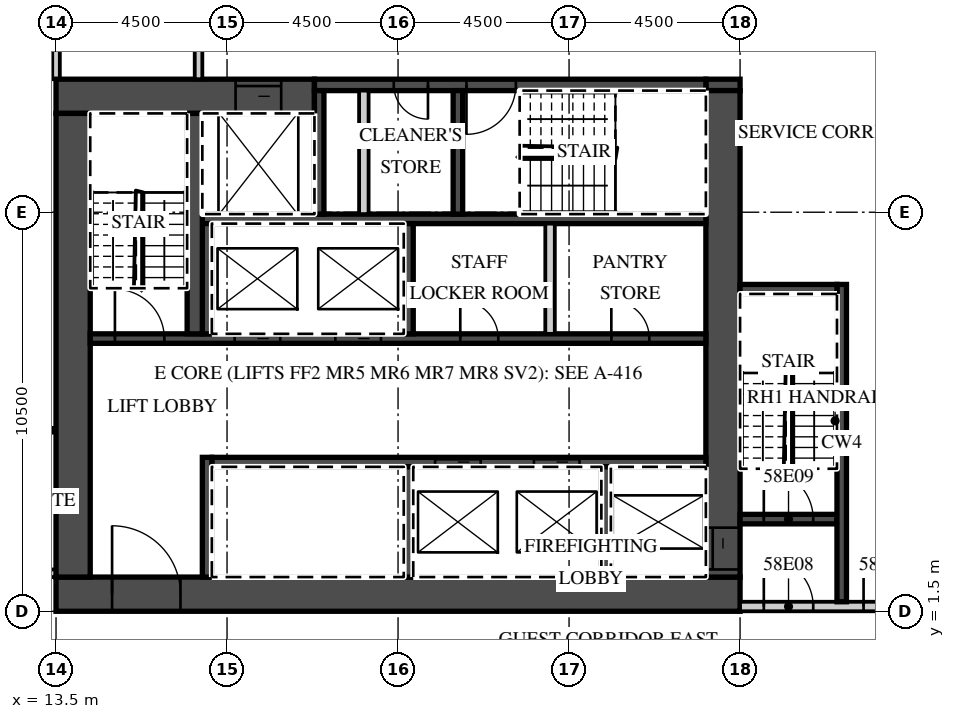
"""IFC4 building model, lengths in metres.
Left out: names, types, materials, properties, quantities, classifications, styles, units other than length and angle.
Written with IfcOpenShell. Run it as: python <this file> out.ifc"""

import sys

from ifc_helpers import new_model, si_unit, direction, frame, frame_2d, origin, place, context, subcontext, project, spatial, rectangle, extrude, element, fill, save


model = new_model("IFC4")
c1 = context("Model", 3, precision=1e-05, world=origin(), true_north=direction((0.0, 1.0)))
c2 = subcontext(c1, "Body", "Model", "MODEL_VIEW")
j1 = project(units=[si_unit("LENGTHUNIT", "METRE"), si_unit("PLANEANGLEUNIT", "RADIAN")], contexts=[c1])
p1 = place(None, origin())
s1 = spatial("IfcSite", under=j1, at=p1, CompositionType="ELEMENT")
p2 = place(p1, origin())
s2 = spatial("IfcBuilding", under=s1, at=p2, CompositionType="ELEMENT")
p3 = place(p2, frame((0.0, 0.0, 237.5)))
s3 = spatial("IfcBuildingStorey", under=s2, at=p3, CompositionType="ELEMENT", Elevation=237.5)
p4 = place(p3, frame((13.5, 15.5, 0.0), z_axis=(0.0, 0.0, 1.0), x_axis=(0.0, 1.0, 0.0)))
e1 = element("IfcWall", 1, at=p4, inside=s3, PredefinedType="PARTITIONING", context=c2, shape_type="SweptSolid", body=[
    extrude(rectangle(XDim=5.436, YDim=0.2, at=frame_2d((2.718, 0.0))), origin(), (0.0, 0.0, 1.0), 3.02),
])
p5 = place(p3, frame((-13.5, 2.5, 0.0), z_axis=(0.0, 0.0, 1.0), x_axis=(1.0, 0.0, 0.0)))
e2 = element("IfcWall", 2, at=p5, inside=s3, PredefinedType="PARTITIONING", context=c2, shape_type="SweptSolid", body=[
    extrude(rectangle(XDim=27.0, YDim=0.2, at=frame_2d((13.5, 0.0))), origin(), (0.0, 0.0, 1.0), 3.02),
])
p6 = place(p5, frame((2.925, 0.0, 0.0)))
e3 = element("IfcOpeningElement", 3, at=p6, cuts=e2, PredefinedType="OPENING", context=c2, shape_type="SweptSolid", body=[
    extrude(rectangle(XDim=1.0, YDim=2.1, at=frame_2d((0.5, 1.05))), frame((0.0, 0.11, 0.0), z_axis=(0.0, -1.0, 0.0), x_axis=(1.0, 0.0, 0.0)), (0.0, 0.0, 1.0), 0.22),
])
p7 = place(p5, frame((7.45, 0.0, 0.0)))
e4 = element("IfcOpeningElement", 4, at=p7, cuts=e2, PredefinedType="OPENING", context=c2, shape_type="SweptSolid", body=[
    extrude(rectangle(XDim=1.0, YDim=2.1, at=frame_2d((0.5, 1.05))), frame((0.0, 0.11, 0.0), z_axis=(0.0, -1.0, 0.0), x_axis=(1.0, 0.0, 0.0)), (0.0, 0.0, 1.0), 0.22),
])
p8 = place(p5, frame((11.925, 0.0, 0.0)))
e5 = element("IfcOpeningElement", 5, at=p8, cuts=e2, PredefinedType="OPENING", context=c2, shape_type="SweptSolid", body=[
    extrude(rectangle(XDim=1.0, YDim=2.1, at=frame_2d((0.5, 1.05))), frame((0.0, 0.11, 0.0), z_axis=(0.0, -1.0, 0.0), x_axis=(1.0, 0.0, 0.0)), (0.0, 0.0, 1.0), 0.22),
])
p9 = place(p5, frame((16.45, 0.0, 0.0)))
e6 = element("IfcOpeningElement", 6, at=p9, cuts=e2, PredefinedType="OPENING", context=c2, shape_type="SweptSolid", body=[
    extrude(rectangle(XDim=1.0, YDim=2.1, at=frame_2d((0.5, 1.05))), frame((0.0, 0.11, 0.0), z_axis=(0.0, -1.0, 0.0), x_axis=(1.0, 0.0, 0.0)), (0.0, 0.0, 1.0), 0.22),
])
p10 = place(p5, frame((18.55, 0.0, 0.0)))
e7 = element("IfcOpeningElement", 7, at=p10, cuts=e2, PredefinedType="OPENING", context=c2, shape_type="SweptSolid", body=[
    extrude(rectangle(XDim=1.0, YDim=2.1, at=frame_2d((0.5, 1.05))), frame((0.0, 0.11, 0.0), z_axis=(0.0, -1.0, 0.0), x_axis=(1.0, 0.0, 0.0)), (0.0, 0.0, 1.0), 0.22),
])
p11 = place(p5, frame((23.075, 0.0, 0.0)))
e8 = element("IfcOpeningElement", 8, at=p11, cuts=e2, PredefinedType="OPENING", context=c2, shape_type="SweptSolid", body=[
    extrude(rectangle(XDim=1.0, YDim=2.1, at=frame_2d((0.5, 1.05))), frame((0.0, 0.11, 0.0), z_axis=(0.0, -1.0, 0.0), x_axis=(1.0, 0.0, 0.0)), (0.0, 0.0, 1.0), 0.22),
])
p12 = place(p3, frame((13.5, 1.95, 0.0), z_axis=(0.0, 0.0, 1.0), x_axis=(1.0, 0.0, 0.0)))
e9 = element("IfcWall", 9, at=p12, inside=s3, PredefinedType="SHEAR", context=c2, shape_type="SweptSolid", body=[
    extrude(rectangle(XDim=18.0, YDim=0.9, at=frame_2d((9.0, 0.0))), origin(), (0.0, 0.0, 1.0), 3.02),
])
p13 = place(p12, frame((1.475, 0.0, 0.0)))
e10 = element("IfcOpeningElement", 10, at=p13, cuts=e9, PredefinedType="OPENING", context=c2, shape_type="SweptSolid", body=[
    extrude(rectangle(XDim=1.8, YDim=2.1, at=frame_2d((0.9, 1.05))), frame((0.0, 0.46, 0.0), z_axis=(0.0, -1.0, 0.0), x_axis=(1.0, 0.0, 0.0)), (0.0, 0.0, 1.0), 0.92),
])
p14 = place(p3, frame((13.5, 15.05, 0.0), z_axis=(0.0, 0.0, 1.0), x_axis=(1.0, 0.0, 0.0)))
e11 = element("IfcWall", 11, at=p14, inside=s3, PredefinedType="SHEAR", context=c2, shape_type="SweptSolid", body=[
    extrude(rectangle(XDim=6.8, YDim=0.9, at=frame_2d((3.4, 0.0))), origin(), (0.0, 0.0, 1.0), 3.02),
])
p15 = place(p14, frame((4.725, 0.0, 0.0)))
e12 = element("IfcOpeningElement", 12, at=p15, cuts=e11, PredefinedType="OPENING", context=c2, shape_type="SweptSolid", body=[
    extrude(rectangle(XDim=1.2, YDim=2.1, at=frame_2d((0.6, 1.05))), frame((0.0, 0.46, 0.0), z_axis=(0.0, -1.0, 0.0), x_axis=(1.0, 0.0, 0.0)), (0.0, 0.0, 1.0), 0.92),
])
p16 = place(p3, frame((30.6, 15.35, 0.0), z_axis=(0.0, 0.0, 1.0), x_axis=(1.0, 0.0, 0.0)))
e13 = element("IfcWall", 13, at=p16, inside=s3, PredefinedType="SHEAR", context=c2, shape_type="SweptSolid", body=[
    extrude(rectangle(XDim=0.9, YDim=0.3, at=frame_2d((0.45, 0.0))), origin(), (0.0, 0.0, 1.0), 3.02),
])
p17 = place(p3, frame((20.3, 15.35, 0.0), z_axis=(0.0, 0.0, 1.0), x_axis=(1.0, 0.0, 0.0)))
e14 = element("IfcWall", 14, at=p17, inside=s3, PredefinedType="SHEAR", context=c2, shape_type="SweptSolid", body=[
    extrude(rectangle(XDim=10.3, YDim=0.3, at=frame_2d((5.15, 0.0))), origin(), (0.0, 0.0, 1.0), 3.02),
])
p18 = place(p17, frame((4.0, 0.0, 0.0)))
e15 = element("IfcOpeningElement", 15, at=p18, cuts=e14, PredefinedType="OPENING", context=c2, shape_type="SweptSolid", body=[
    extrude(rectangle(XDim=1.3, YDim=2.1, at=frame_2d((0.65, 1.05))), frame((0.0, 0.16, 0.0), z_axis=(0.0, -1.0, 0.0), x_axis=(1.0, 0.0, 0.0)), (0.0, 0.0, 1.0), 0.32),
])
p19 = place(p17, frame((2.087, 0.0, 0.0)))
e16 = element("IfcOpeningElement", 16, at=p19, cuts=e14, PredefinedType="OPENING", context=c2, shape_type="SweptSolid", body=[
    extrude(rectangle(XDim=0.9, YDim=2.1, at=frame_2d((0.45, 1.05))), frame((0.0, 0.16, 0.0), z_axis=(0.0, -1.0, 0.0), x_axis=(1.0, 0.0, 0.0)), (0.0, 0.0, 1.0), 0.32),
])
p20 = place(p3, frame((31.05, 2.4, 0.0), z_axis=(0.0, 0.0, 1.0), x_axis=(0.0, 1.0, 0.0)))
e17 = element("IfcWall", 17, at=p20, inside=s3, PredefinedType="SHEAR", context=c2, shape_type="SweptSolid", body=[
    extrude(rectangle(XDim=12.8, YDim=0.9, at=frame_2d((6.4, 0.0))), origin(), (0.0, 0.0, 1.0), 3.02),
])
p21 = place(p20, frame((0.2, 0.0, 0.0)))
e18 = element("IfcOpeningElement", 18, at=p21, cuts=e17, PredefinedType="OPENING", context=c2, shape_type="SweptSolid", body=[
    extrude(rectangle(XDim=1.1, YDim=2.1, at=frame_2d((0.55, 1.05))), frame((0.0, 0.46, 0.0), z_axis=(0.0, -1.0, 0.0), x_axis=(1.0, 0.0, 0.0)), (0.0, 0.0, 1.0), 0.92),
])
p22 = place(p3, frame((13.95, 2.4, 0.0), z_axis=(0.0, 0.0, 1.0), x_axis=(0.0, 1.0, 0.0)))
e19 = element("IfcWall", 19, at=p22, inside=s3, PredefinedType="SHEAR", context=c2, shape_type="SweptSolid", body=[
    extrude(rectangle(XDim=12.2, YDim=0.9, at=frame_2d((6.1, 0.0))), origin(), (0.0, 0.0, 1.0), 3.02),
])
p23 = place(p3, frame((17.6, 5.425, 0.0), z_axis=(0.0, 0.0, 1.0), x_axis=(1.0, 0.0, 0.0)))
e20 = element("IfcWall", 20, at=p23, inside=s3, PredefinedType="SHEAR", context=c2, shape_type="SweptSolid", body=[
    extrude(rectangle(XDim=13.0, YDim=0.25, at=frame_2d((6.5, 0.0))), origin(), (0.0, 0.0, 1.0), 3.02),
])
p24 = place(p23, frame((8.475, 0.0, 0.0)))
e21 = element("IfcOpeningElement", 21, at=p24, cuts=e20, PredefinedType="OPENING", context=c2, shape_type="SweptSolid", body=[
    extrude(rectangle(XDim=1.2, YDim=2.1, at=frame_2d((0.6, 1.05))), frame((0.0, 0.135, 0.0), z_axis=(0.0, -1.0, 0.0), x_axis=(1.0, 0.0, 0.0)), (0.0, 0.0, 1.0), 0.27),
])
p25 = place(p23, frame((5.875, 0.0, 0.0)))
e22 = element("IfcOpeningElement", 22, at=p25, cuts=e20, PredefinedType="OPENING", context=c2, shape_type="SweptSolid", body=[
    extrude(rectangle(XDim=1.2, YDim=2.1, at=frame_2d((0.6, 1.05))), frame((0.0, 0.135, 0.0), z_axis=(0.0, -1.0, 0.0), x_axis=(1.0, 0.0, 0.0)), (0.0, 0.0, 1.0), 0.27),
])
p26 = place(p3, frame((17.475, 2.4, 0.0), z_axis=(0.0, 0.0, 1.0), x_axis=(0.0, 1.0, 0.0)))
e23 = element("IfcWall", 23, at=p26, inside=s3, PredefinedType="SHEAR", context=c2, shape_type="SweptSolid", body=[
    extrude(rectangle(XDim=3.15, YDim=0.25, at=frame_2d((1.575, 0.0))), origin(), (0.0, 0.0, 1.0), 3.02),
])
for number, where, z_axis, x_axis in (
    (24, (27.975, 2.4, 0.0), (0.0, 0.0, 1.0), (0.0, 1.0, 0.0)),
    (25, (22.775, 2.4, 0.0), (0.0, 0.0, 1.0), (0.0, 1.0, 0.0)),
):
    element("IfcWall", number, at=place(p3, frame(where, z_axis=z_axis, x_axis=x_axis)), inside=s3, PredefinedType="SHEAR", context=c2, shape_type="SweptSolid", body=[
        extrude(rectangle(XDim=2.9, YDim=0.25, at=frame_2d((1.45, 0.0))), origin(), (0.0, 0.0, 1.0), 3.02),
    ])
p27 = place(p3, frame((14.4, 8.675, 0.0), z_axis=(0.0, 0.0, 1.0), x_axis=(1.0, 0.0, 0.0)))
e26 = element("IfcWall", 26, at=p27, inside=s3, PredefinedType="SHEAR", context=c2, shape_type="SweptSolid", body=[
    extrude(rectangle(XDim=16.2, YDim=0.25, at=frame_2d((8.1, 0.0))), origin(), (0.0, 0.0, 1.0), 3.02),
])
p28 = place(p27, frame((6.45, 0.0, 0.0)))
e27 = element("IfcOpeningElement", 27, at=p28, cuts=e26, PredefinedType="OPENING", context=c2, shape_type="SweptSolid", body=[
    extrude(rectangle(XDim=1.2, YDim=2.1, at=frame_2d((0.6, 1.05))), frame((0.0, 0.135, 0.0), z_axis=(0.0, -1.0, 0.0), x_axis=(1.0, 0.0, 0.0)), (0.0, 0.0, 1.0), 0.27),
])
p29 = place(p27, frame((3.8, 0.0, 0.0)))
e28 = element("IfcOpeningElement", 28, at=p29, cuts=e26, PredefinedType="OPENING", context=c2, shape_type="SweptSolid", body=[
    extrude(rectangle(XDim=1.2, YDim=2.1, at=frame_2d((0.6, 1.05))), frame((0.0, 0.135, 0.0), z_axis=(0.0, -1.0, 0.0), x_axis=(1.0, 0.0, 0.0)), (0.0, 0.0, 1.0), 0.27),
])
p30 = place(p27, frame((0.65, 0.0, 0.0)))
e29 = element("IfcOpeningElement", 29, at=p30, cuts=e26, PredefinedType="OPENING", context=c2, shape_type="SweptSolid", body=[
    extrude(rectangle(XDim=1.3, YDim=2.1, at=frame_2d((0.65, 1.05))), frame((0.0, 0.135, 0.0), z_axis=(0.0, -1.0, 0.0), x_axis=(1.0, 0.0, 0.0)), (0.0, 0.0, 1.0), 0.27),
])
p31 = place(p27, frame((13.712, 0.0, 0.0)))
e30 = element("IfcOpeningElement", 30, at=p31, cuts=e26, PredefinedType="OPENING", context=c2, shape_type="SweptSolid", body=[
    extrude(rectangle(XDim=1.0, YDim=2.1, at=frame_2d((0.5, 1.05))), frame((0.0, 0.135, 0.0), z_axis=(0.0, -1.0, 0.0), x_axis=(1.0, 0.0, 0.0)), (0.0, 0.0, 1.0), 0.27),
])
p32 = place(p27, frame((9.738, 0.0, 0.0)))
e31 = element("IfcOpeningElement", 31, at=p32, cuts=e26, PredefinedType="OPENING", context=c2, shape_type="SweptSolid", body=[
    extrude(rectangle(XDim=1.0, YDim=2.1, at=frame_2d((0.5, 1.05))), frame((0.0, 0.135, 0.0), z_axis=(0.0, -1.0, 0.0), x_axis=(1.0, 0.0, 0.0)), (0.0, 0.0, 1.0), 0.27),
])
p33 = place(p3, frame((17.35, 11.825, 0.0), z_axis=(0.0, 0.0, 1.0), x_axis=(1.0, 0.0, 0.0)))
e32 = element("IfcWall", 32, at=p33, inside=s3, PredefinedType="SHEAR", context=c2, shape_type="SweptSolid", body=[
    extrude(rectangle(XDim=13.25, YDim=0.25, at=frame_2d((6.625, 0.0))), origin(), (0.0, 0.0, 1.0), 3.02),
])
for number, where, z_axis, x_axis in (
    (33, (17.475, 8.8, 0.0), (0.0, 0.0, 1.0), (0.0, 1.0, 0.0)),
    (34, (22.775, 8.8, 0.0), (0.0, 0.0, 1.0), (0.0, 1.0, 0.0)),
):
    element("IfcWall", number, at=place(p3, frame(where, z_axis=z_axis, x_axis=x_axis)), inside=s3, PredefinedType="SHEAR", context=c2, shape_type="SweptSolid", body=[
        extrude(rectangle(XDim=2.9, YDim=0.25, at=frame_2d((1.45, 0.0))), origin(), (0.0, 0.0, 1.0), 3.02),
    ])
p34 = place(p3, frame((26.5, 8.8, 0.0), z_axis=(0.0, 0.0, 1.0), x_axis=(0.0, 1.0, 0.0)))
e35 = element("IfcWall", 35, at=p34, inside=s3, PredefinedType="PARTITIONING", context=c2, shape_type="SweptSolid", body=[
    extrude(rectangle(XDim=2.9, YDim=0.25, at=frame_2d((1.45, 0.0))), origin(), (0.0, 0.0, 1.0), 3.02),
])
p35 = place(p3, frame((17.15, 8.8, 0.0), z_axis=(0.0, 0.0, 1.0), x_axis=(0.0, 1.0, 0.0)))
e36 = element("IfcWall", 36, at=p35, inside=s3, PredefinedType="SHEAR", context=c2, shape_type="SweptSolid", body=[
    extrude(rectangle(XDim=5.8, YDim=0.4, at=frame_2d((2.9, 0.0))), origin(), (0.0, 0.0, 1.0), 3.02),
])
for number, where, z_axis, x_axis in (
    (37, (20.425, 11.95, 0.0), (0.0, 0.0, 1.0), (0.0, 1.0, 0.0)),
    (38, (24.075, 11.95, 0.0), (0.0, 0.0, 1.0), (0.0, 1.0, 0.0)),
):
    element("IfcWall", number, at=place(p3, frame(where, z_axis=z_axis, x_axis=x_axis)), inside=s3, PredefinedType="SHEAR", context=c2, shape_type="SweptSolid", body=[
        extrude(rectangle(XDim=3.25, YDim=0.25, at=frame_2d((1.625, 0.0))), origin(), (0.0, 0.0, 1.0), 3.02),
    ])
p36 = place(p3, frame((21.6, 11.95, 0.0), z_axis=(0.0, 0.0, 1.0), x_axis=(0.0, 1.0, 0.0)))
e39 = element("IfcWall", 39, at=p36, inside=s3, PredefinedType="PARTITIONING", context=c2, shape_type="SweptSolid", body=[
    extrude(rectangle(XDim=3.25, YDim=0.25, at=frame_2d((1.625, 0.0))), origin(), (0.0, 0.0, 1.0), 3.02),
])
p37 = place(p3, frame((31.5, 1.625, 0.0), z_axis=(0.0, 0.0, 1.0), x_axis=(1.0, 0.0, 0.0)))
e40 = element("IfcWall", 40, at=p37, inside=s3, PredefinedType="PARTITIONING", context=c2, shape_type="SweptSolid", body=[
    extrude(rectangle(XDim=11.04, YDim=0.25, at=frame_2d((5.52, 0.0))), origin(), (0.0, 0.0, 1.0), 3.02),
])
p38 = place(p37, frame((0.625, 0.0, 0.0)))
e41 = element("IfcOpeningElement", 41, at=p38, cuts=e40, PredefinedType="OPENING", context=c2, shape_type="SweptSolid", body=[
    extrude(rectangle(XDim=1.3, YDim=2.1, at=frame_2d((0.65, 1.05))), frame((0.0, 0.135, 0.0), z_axis=(0.0, -1.0, 0.0), x_axis=(1.0, 0.0, 0.0)), (0.0, 0.0, 1.0), 0.27),
])
p39 = place(p37, frame((3.25, 0.0, 0.0)))
e42 = element("IfcOpeningElement", 42, at=p39, cuts=e40, PredefinedType="OPENING", context=c2, shape_type="SweptSolid", body=[
    extrude(rectangle(XDim=1.1, YDim=2.1, at=frame_2d((0.55, 1.05))), frame((0.0, 0.135, 0.0), z_axis=(0.0, -1.0, 0.0), x_axis=(1.0, 0.0, 0.0)), (0.0, 0.0, 1.0), 0.27),
])
p40 = place(p3, frame((31.5, 3.925, 0.0), z_axis=(0.0, 0.0, 1.0), x_axis=(1.0, 0.0, 0.0)))
e43 = element("IfcWall", 43, at=p40, inside=s3, PredefinedType="SHEAR", context=c2, shape_type="SweptSolid", body=[
    extrude(rectangle(XDim=2.55, YDim=0.25, at=frame_2d((1.275, 0.0))), origin(), (0.0, 0.0, 1.0), 3.02),
])
p41 = place(p40, frame((0.625, 0.0, 0.0)))
e44 = element("IfcOpeningElement", 44, at=p41, cuts=e43, PredefinedType="OPENING", context=c2, shape_type="SweptSolid", body=[
    extrude(rectangle(XDim=1.3, YDim=2.1, at=frame_2d((0.65, 1.05))), frame((0.0, 0.135, 0.0), z_axis=(0.0, -1.0, 0.0), x_axis=(1.0, 0.0, 0.0)), (0.0, 0.0, 1.0), 0.27),
])
p42 = place(p3, frame((34.175, 1.75, 0.0), z_axis=(0.0, 0.0, 1.0), x_axis=(0.0, 1.0, 0.0)))
e45 = element("IfcWall", 45, at=p42, inside=s3, PredefinedType="SHEAR", context=c2, shape_type="SweptSolid", body=[
    extrude(rectangle(XDim=8.35, YDim=0.25, at=frame_2d((4.175, 0.0))), origin(), (0.0, 0.0, 1.0), 3.02),
])
p43 = place(p3, frame((31.5, 9.975, 0.0), z_axis=(0.0, 0.0, 1.0), x_axis=(1.0, 0.0, 0.0)))
e46 = element("IfcWall", 46, at=p43, inside=s3, PredefinedType="SHEAR", context=c2, shape_type="SweptSolid", body=[
    extrude(rectangle(XDim=2.55, YDim=0.25, at=frame_2d((1.275, 0.0))), origin(), (0.0, 0.0, 1.0), 3.02),
])
p44 = place(p3, frame((17.25, 15.5, 0.0), z_axis=(0.0, 0.0, 1.0), x_axis=(0.0, 1.0, 0.0)))
e47 = element("IfcWall", 47, at=p44, inside=s3, PredefinedType="PARTITIONING", context=c2, shape_type="SweptSolid", body=[
    extrude(rectangle(XDim=2.2, YDim=0.2, at=frame_2d((1.1, 0.0))), origin(), (0.0, 0.0, 1.0), 3.02),
])
p45 = place(p28, origin())
e48 = element("IfcDoor", 48, at=p45, inside=s3, OperationType="SLIDING_TO_LEFT", PredefinedType="DOOR", context=c2, shape_type="SweptSolid", body=[
    extrude(rectangle(XDim=1.2, YDim=2.1, at=frame_2d((0.6, 1.05))), frame((0.0, 0.025, 0.0), z_axis=(0.0, -1.0, 0.0), x_axis=(1.0, 0.0, 0.0)), (0.0, 0.0, 1.0), 0.05),
])
fill(e27, e48)
p46 = place(p29, origin())
e49 = element("IfcDoor", 49, at=p46, inside=s3, OperationType="SLIDING_TO_RIGHT", PredefinedType="DOOR", context=c2, shape_type="SweptSolid", body=[
    extrude(rectangle(XDim=1.2, YDim=2.1, at=frame_2d((0.6, 1.05))), frame((0.0, 0.025, 0.0), z_axis=(0.0, -1.0, 0.0), x_axis=(1.0, 0.0, 0.0)), (0.0, 0.0, 1.0), 0.05),
])
fill(e28, e49)
p47 = place(p24, origin())
e50 = element("IfcDoor", 50, at=p47, inside=s3, OperationType="SLIDING_TO_LEFT", PredefinedType="DOOR", context=c2, shape_type="SweptSolid", body=[
    extrude(rectangle(XDim=1.2, YDim=2.1, at=frame_2d((0.6, 1.05))), frame((0.0, 0.025, 0.0), z_axis=(0.0, -1.0, 0.0), x_axis=(1.0, 0.0, 0.0)), (0.0, 0.0, 1.0), 0.05),
])
fill(e21, e50)
p48 = place(p25, origin())
e51 = element("IfcDoor", 51, at=p48, inside=s3, OperationType="SLIDING_TO_RIGHT", PredefinedType="DOOR", context=c2, shape_type="SweptSolid", body=[
    extrude(rectangle(XDim=1.2, YDim=2.1, at=frame_2d((0.6, 1.05))), frame((0.0, 0.025, 0.0), z_axis=(0.0, -1.0, 0.0), x_axis=(1.0, 0.0, 0.0)), (0.0, 0.0, 1.0), 0.05),
])
fill(e22, e51)
p49 = place(p15, origin())
e52 = element("IfcDoor", 52, at=p49, inside=s3, OperationType="SLIDING_TO_LEFT", PredefinedType="DOOR", context=c2, shape_type="SweptSolid", body=[
    extrude(rectangle(XDim=1.2, YDim=2.1, at=frame_2d((0.6, 1.05))), frame((0.0, 0.025, 0.0), z_axis=(0.0, -1.0, 0.0), x_axis=(1.0, 0.0, 0.0)), (0.0, 0.0, 1.0), 0.05),
])
fill(e12, e52)
p50 = place(p21, origin())
e53 = element("IfcDoor", 53, at=p50, inside=s3, OperationType="SLIDING_TO_LEFT", PredefinedType="DOOR", context=c2, shape_type="SweptSolid", body=[
    extrude(rectangle(XDim=1.1, YDim=2.1, at=frame_2d((0.55, 1.05))), frame((0.0, 0.025, 0.0), z_axis=(0.0, -1.0, 0.0), x_axis=(1.0, 0.0, 0.0)), (0.0, 0.0, 1.0), 0.05),
])
fill(e18, e53)
p51 = place(p13, origin())
e54 = element("IfcDoor", 54, at=p51, inside=s3, OperationType="DOUBLE_DOOR_DOUBLE_SWING", PredefinedType="DOOR", context=c2, shape_type="SweptSolid", body=[
    extrude(rectangle(XDim=1.8, YDim=2.1, at=frame_2d((0.9, 1.05))), frame((0.0, 0.025, 0.0), z_axis=(0.0, -1.0, 0.0), x_axis=(1.0, 0.0, 0.0)), (0.0, 0.0, 1.0), 0.05),
])
fill(e10, e54)
p52 = place(p38, origin())
e55 = element("IfcDoor", 55, at=p52, inside=s3, OperationType="SINGLE_SWING_LEFT", PredefinedType="DOOR", context=c2, shape_type="SweptSolid", body=[
    extrude(rectangle(XDim=1.3, YDim=2.1, at=frame_2d((0.65, 1.05))), frame((0.0, 0.025, 0.0), z_axis=(0.0, -1.0, 0.0), x_axis=(1.0, 0.0, 0.0)), (0.0, 0.0, 1.0), 0.05),
])
fill(e41, e55)
p53 = place(p41, origin())
e56 = element("IfcDoor", 56, at=p53, inside=s3, OperationType="SINGLE_SWING_LEFT", PredefinedType="DOOR", context=c2, shape_type="SweptSolid", body=[
    extrude(rectangle(XDim=1.3, YDim=2.1, at=frame_2d((0.65, 1.05))), frame((0.0, 0.025, 0.0), z_axis=(0.0, -1.0, 0.0), x_axis=(1.0, 0.0, 0.0)), (0.0, 0.0, 1.0), 0.05),
])
fill(e44, e56)
p54 = place(p39, origin())
e57 = element("IfcDoor", 57, at=p54, inside=s3, OperationType="SINGLE_SWING_LEFT", PredefinedType="DOOR", context=c2, shape_type="SweptSolid", body=[
    extrude(rectangle(XDim=1.1, YDim=2.1, at=frame_2d((0.55, 1.05))), frame((0.0, 0.025, 0.0), z_axis=(0.0, -1.0, 0.0), x_axis=(1.0, 0.0, 0.0)), (0.0, 0.0, 1.0), 0.05),
])
fill(e42, e57)
p55 = place(p30, origin())
e58 = element("IfcDoor", 58, at=p55, inside=s3, OperationType="SINGLE_SWING_LEFT", PredefinedType="DOOR", context=c2, shape_type="SweptSolid", body=[
    extrude(rectangle(XDim=1.3, YDim=2.1, at=frame_2d((0.65, 1.05))), frame((0.0, 0.025, 0.0), z_axis=(0.0, -1.0, 0.0), x_axis=(1.0, 0.0, 0.0)), (0.0, 0.0, 1.0), 0.05),
])
fill(e29, e58)
p56 = place(p18, origin())
e59 = element("IfcDoor", 59, at=p56, inside=s3, OperationType="SINGLE_SWING_LEFT", PredefinedType="DOOR", context=c2, shape_type="SweptSolid", body=[
    extrude(rectangle(XDim=1.3, YDim=2.1, at=frame_2d((0.65, 1.05))), frame((0.0, 0.025, 0.0), z_axis=(0.0, -1.0, 0.0), x_axis=(1.0, 0.0, 0.0)), (0.0, 0.0, 1.0), 0.05),
])
fill(e15, e59)
p57 = place(p19, origin())
e60 = element("IfcDoor", 60, at=p57, inside=s3, OperationType="SINGLE_SWING_RIGHT", PredefinedType="DOOR", context=c2, shape_type="SweptSolid", body=[
    extrude(rectangle(XDim=0.9, YDim=2.1, at=frame_2d((0.45, 1.05))), frame((0.0, 0.025, 0.0), z_axis=(0.0, -1.0, 0.0), x_axis=(1.0, 0.0, 0.0)), (0.0, 0.0, 1.0), 0.05),
])
fill(e16, e60)
p58 = place(p31, origin())
e61 = element("IfcDoor", 61, at=p58, inside=s3, OperationType="SINGLE_SWING_LEFT", PredefinedType="DOOR", context=c2, shape_type="SweptSolid", body=[
    extrude(rectangle(XDim=1.0, YDim=2.1, at=frame_2d((0.5, 1.05))), frame((0.0, 0.025, 0.0), z_axis=(0.0, -1.0, 0.0), x_axis=(1.0, 0.0, 0.0)), (0.0, 0.0, 1.0), 0.05),
])
fill(e30, e61)
p59 = place(p32, origin())
e62 = element("IfcDoor", 62, at=p59, inside=s3, OperationType="SINGLE_SWING_LEFT", PredefinedType="DOOR", context=c2, shape_type="SweptSolid", body=[
    extrude(rectangle(XDim=1.0, YDim=2.1, at=frame_2d((0.5, 1.05))), frame((0.0, 0.025, 0.0), z_axis=(0.0, -1.0, 0.0), x_axis=(1.0, 0.0, 0.0)), (0.0, 0.0, 1.0), 0.05),
])
fill(e31, e62)
save(model, sys.argv[1])
